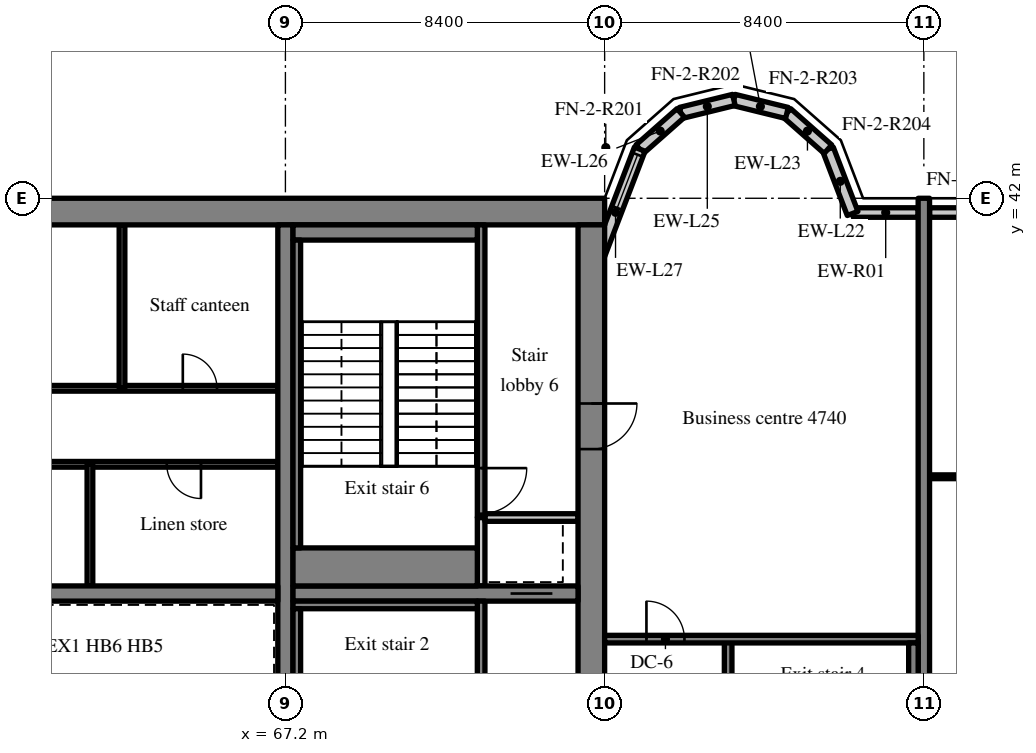
"""IFC4 building model, lengths in metres.
Left out: names, types, materials, properties, quantities, classifications, styles, units other than length and angle.
Written with IfcOpenShell. Run it as: python <this file> out.ifc"""

import sys

from ifc_helpers import new_model, si_unit, direction, frame, frame_2d, origin, place, context, subcontext, project, spatial, rectangle, extrude, source, transform, mapped, element, fill, save


model = new_model("IFC4")
c1 = context("Model", 3, precision=1e-05, world=origin(), true_north=direction((0.0, 1.0)))
c2 = subcontext(c1, "Body", "Model", "MODEL_VIEW")
j1 = project(units=[si_unit("LENGTHUNIT", "METRE"), si_unit("PLANEANGLEUNIT", "RADIAN")], contexts=[c1])
p1 = place(None, origin())
s1 = spatial("IfcSite", under=j1, at=p1, CompositionType="ELEMENT")
p2 = place(p1, origin())
s2 = spatial("IfcBuilding", under=s1, at=p2, CompositionType="ELEMENT")
p3 = place(p2, frame((0.0, 0.0, 193.4)))
s3 = spatial("IfcBuildingStorey", under=s2, at=p3, CompositionType="ELEMENT", Elevation=193.4)
m1 = source(origin(), c2, "Body", "SweptSolid", [
    extrude(rectangle(XDim=50.4, YDim=0.7, at=frame_2d((25.2, 0.0))), origin(), (0.0, 0.0, 1.0), 3.52),
])
p4 = place(p3, frame((25.2, 41.65, 0.0), z_axis=(0.0, 0.0, 1.0), x_axis=(1.0, 0.0, 0.0)))
e1 = element("IfcWall", 1, at=p4, inside=s3, PredefinedType="SHEAR", context=c2, shape_type="MappedRepresentation", body=[
    mapped(m1, transform((0.0, 0.0, 0.0), scale=1.0)),
])
m2 = source(origin(), c2, "Body", "SweptSolid", [
    extrude(rectangle(XDim=18.6, YDim=0.7, at=frame_2d((9.3, 0.0))), origin(), (0.0, 0.0, 1.0), 3.52),
])
p5 = place(p3, frame((75.25, 22.7, 0.0), z_axis=(0.0, 0.0, 1.0), x_axis=(0.0, 1.0, 0.0)))
e2 = element("IfcWall", 2, at=p5, inside=s3, PredefinedType="SHEAR", context=c2, shape_type="MappedRepresentation", body=[
    mapped(m2, transform((0.0, 0.0, 0.0), scale=1.0)),
])
m3 = source(origin(), c2, "Body", "SweptSolid", [
    extrude(rectangle(XDim=1.2, YDim=2.1, at=frame_2d((0.6, 1.05))), frame((0.0, 0.36, 0.0), z_axis=(0.0, -1.0, 0.0), x_axis=(1.0, 0.0, 0.0)), (0.0, 0.0, 1.0), 0.72),
])
p6 = place(p5, frame((12.7, 0.0, 0.0)))
e3 = element("IfcOpeningElement", 3, at=p6, cuts=e2, PredefinedType="OPENING", context=c2, shape_type="MappedRepresentation", body=[
    mapped(m3, transform((0.0, 0.0, 0.0), scale=1.0)),
])
m4 = source(origin(), c2, "Body", "SweptSolid", [
    extrude(rectangle(XDim=18.6, YDim=0.4, at=frame_2d((9.3, 0.0))), origin(), (0.0, 0.0, 1.0), 3.52),
])
p7 = place(p3, frame((67.2, 22.7, 0.0), z_axis=(0.0, 0.0, 1.0), x_axis=(0.0, 1.0, 0.0)))
e4 = element("IfcWall", 4, at=p7, inside=s3, PredefinedType="SHEAR", context=c2, shape_type="MappedRepresentation", body=[
    mapped(m4, transform((0.0, 0.0, 0.0), scale=1.0)),
])
m5 = source(origin(), c2, "Body", "SweptSolid", [
    extrude(rectangle(XDim=16.4, YDim=0.4, at=frame_2d((8.2, 0.0))), origin(), (0.0, 0.0, 1.0), 3.52),
])
p8 = place(p3, frame((50.6, 31.6, 0.0), z_axis=(0.0, 0.0, 1.0), x_axis=(1.0, 0.0, 0.0)))
e5 = element("IfcWall", 5, at=p8, inside=s3, PredefinedType="SHEAR", context=c2, shape_type="MappedRepresentation", body=[
    mapped(m5, transform((0.0, 0.0, 0.0), scale=1.0)),
])
m6 = source(origin(), c2, "Body", "SweptSolid", [
    extrude(rectangle(XDim=1.0, YDim=2.1, at=frame_2d((0.5, 1.05))), frame((0.0, 0.21, 0.0), z_axis=(0.0, -1.0, 0.0), x_axis=(1.0, 0.0, 0.0)), (0.0, 0.0, 1.0), 0.42),
])
p9 = place(p8, frame((0.6, 0.0, 0.0)))
e6 = element("IfcOpeningElement", 6, at=p9, cuts=e5, PredefinedType="OPENING", context=c2, shape_type="MappedRepresentation", body=[
    mapped(m6, transform((0.0, 0.0, 0.0), scale=1.0)),
])
m7 = source(origin(), c2, "Body", "SweptSolid", [
    extrude(rectangle(XDim=7.5, YDim=0.4, at=frame_2d((3.75, 0.0))), origin(), (0.0, 0.0, 1.0), 3.52),
])
p10 = place(p3, frame((67.4, 31.6, 0.0), z_axis=(0.0, 0.0, 1.0), x_axis=(1.0, 0.0, 0.0)))
e7 = element("IfcWall", 7, at=p10, inside=s3, PredefinedType="SHEAR", context=c2, shape_type="MappedRepresentation", body=[
    mapped(m7, transform((0.0, 0.0, 0.0), scale=1.0)),
])
m8 = source(origin(), c2, "Body", "SweptSolid", [
    extrude(rectangle(XDim=1.1, YDim=2.1, at=frame_2d((0.55, 1.05))), frame((0.0, 0.21, 0.0), z_axis=(0.0, -1.0, 0.0), x_axis=(1.0, 0.0, 0.0)), (0.0, 0.0, 1.0), 0.42),
])
p11 = place(p10, frame((5.725, 0.0, 0.0)))
e8 = element("IfcOpeningElement", 8, at=p11, cuts=e7, PredefinedType="OPENING", context=c2, shape_type="MappedRepresentation", body=[
    mapped(m8, transform((0.0, 0.0, 0.0), scale=1.0)),
])
m9 = source(origin(), c2, "Body", "SweptSolid", [
    extrude(rectangle(XDim=20.0, YDim=0.3, at=frame_2d((10.0, 0.0))), origin(), (0.0, 0.0, 1.0), 3.52),
])
p12 = place(p3, frame((84.0, 22.0, 0.0), z_axis=(0.0, 0.0, 1.0), x_axis=(0.0, 1.0, 0.0)))
e9 = element("IfcWall", 9, at=p12, inside=s3, PredefinedType="SHEAR", context=c2, shape_type="MappedRepresentation", body=[
    mapped(m9, transform((0.0, 0.0, 0.0), scale=1.0)),
])
m10 = source(origin(), c2, "Body", "SweptSolid", [
    extrude(rectangle(XDim=1.708, YDim=0.25, at=frame_2d((0.854, 0.0))), origin(), (0.0, 0.0, 1.0), 2.87),
])
p13 = place(p3, frame((83.85, 41.625, 0.0), z_axis=(0.0, 0.0, 1.0), x_axis=(-1.0, 0.0, 0.0)))
e10 = element("IfcWall", 10, at=p13, inside=s3, PredefinedType="SOLIDWALL", context=c2, shape_type="MappedRepresentation", body=[
    mapped(m10, transform((0.0, 0.0, 0.0), scale=1.0)),
])
m11 = source(origin(), c2, "Body", "SweptSolid", [
    extrude(rectangle(XDim=4.095, YDim=0.25, at=frame_2d((2.047, 0.0))), origin(), (0.0, 0.0, 1.0), 2.87),
])
p14 = place(p3, frame((88.245, 41.625, 0.0), z_axis=(0.0, 0.0, 1.0), x_axis=(-1.0, 0.0, 0.0)))
e11 = element("IfcWall", 11, at=p14, inside=s3, PredefinedType="SOLIDWALL", context=c2, shape_type="MappedRepresentation", body=[
    mapped(m11, transform((0.0, 0.0, 0.0), scale=1.0)),
])
m12 = source(origin(), c2, "Body", "SweptSolid", [
    extrude(rectangle(XDim=1.5, YDim=1.5, at=frame_2d((0.75, 0.75))), frame((0.0, 0.135, 0.0), z_axis=(0.0, -1.0, 0.0), x_axis=(1.0, 0.0, 0.0)), (0.0, 0.0, 1.0), 0.27),
])
p15 = place(p14, frame((1.297, 0.0, 0.9)))
e12 = element("IfcOpeningElement", 12, at=p15, cuts=e11, PredefinedType="OPENING", context=c2, shape_type="MappedRepresentation", body=[
    mapped(m12, transform((0.0, 0.0, 0.0), scale=1.0)),
])
m13 = source(origin(), c2, "Body", "SweptSolid", [
    extrude(rectangle(XDim=1.812, YDim=0.3, at=frame_2d((0.906, 0.0))), origin(), (0.0, 0.0, 1.0), 3.52),
])
p16 = place(p3, frame((82.125, 41.6, 0.0), z_axis=(0.0, 0.0, 1.0), x_axis=(-0.357877270961, 0.93376863244, 0.0)))
e13 = element("IfcWall", 13, at=p16, inside=s3, PredefinedType="SOLIDWALL", context=c2, shape_type="MappedRepresentation", body=[
    mapped(m13, transform((0.0, 0.0, 0.0), scale=1.0)),
])
m14 = source(origin(), c2, "Body", "SweptSolid", [
    extrude(rectangle(XDim=1.44, YDim=0.3, at=frame_2d((0.72, 0.0))), origin(), (0.0, 0.0, 1.0), 3.52),
])
p17 = place(p3, frame((81.477, 43.292, 0.0), z_axis=(0.0, 0.0, 1.0), x_axis=(-0.74957555648, 0.661918790432, 0.0)))
e14 = element("IfcWall", 14, at=p17, inside=s3, PredefinedType="SOLIDWALL", context=c2, shape_type="MappedRepresentation", body=[
    mapped(m14, transform((0.0, 0.0, 0.0), scale=1.0)),
])
m15 = source(origin(), c2, "Body", "SweptSolid", [
    extrude(rectangle(XDim=1.439, YDim=0.3, at=frame_2d((0.719, 0.0))), origin(), (0.0, 0.0, 1.0), 3.52),
])
for number, where, z_axis, x_axis in (
    (15, (80.397, 44.245, 0.0), (0.0, 0.0, 1.0), (-0.971, 0.238, 0.0)),
    (16, (79.0, 44.588, 0.0), (0.0, 0.0, 1.0), (-0.971, -0.238, 0.0)),
):
    element("IfcWall", number, at=place(p3, frame(where, z_axis=z_axis, x_axis=x_axis)), inside=s3, PredefinedType="SOLIDWALL", context=c2, shape_type="MappedRepresentation", body=[
        mapped(m15, transform((0.0, 0.0, 0.0), scale=1.0)),
    ])
p18 = place(p3, frame((77.603, 44.245, 0.0), z_axis=(0.0, 0.0, 1.0), x_axis=(-0.74957555648, -0.661918790432, 0.0)))
e17 = element("IfcWall", 17, at=p18, inside=s3, PredefinedType="SOLIDWALL", context=c2, shape_type="MappedRepresentation", body=[
    mapped(m14, transform((0.0, 0.0, 0.0), scale=1.0)),
])
m16 = source(origin(), c2, "Body", "SweptSolid", [
    extrude(rectangle(XDim=3.559, YDim=0.3, at=frame_2d((1.78, 0.0))), origin(), (0.0, 0.0, 1.0), 3.52),
])
p19 = place(p3, frame((76.523, 43.292, 0.0), z_axis=(0.0, 0.0, 1.0), x_axis=(-0.35779745313, -0.933799219604, 0.0)))
e18 = element("IfcWall", 18, at=p19, inside=s3, PredefinedType="SOLIDWALL", context=c2, shape_type="MappedRepresentation", body=[
    mapped(m16, transform((0.0, 0.0, 0.0), scale=1.0)),
])
m17 = source(origin(), c2, "Body", "SweptSolid", [
    extrude(rectangle(XDim=1.5, YDim=2.0, at=frame_2d((0.75, 1.0))), frame((0.0, 0.16, 0.0), z_axis=(0.0, -1.0, 0.0), x_axis=(1.0, 0.0, 0.0)), (0.0, 0.0, 1.0), 0.32),
])
p20 = place(p19, frame((0.156, 0.0, 0.9)))
e19 = element("IfcOpeningElement", 19, at=p20, cuts=e18, PredefinedType="OPENING", context=c2, shape_type="MappedRepresentation", body=[
    mapped(m17, transform((0.0, 0.0, 0.0), scale=1.0)),
])
m18 = source(origin(), c2, "Body", "SweptSolid", [
    extrude(rectangle(XDim=14.2, YDim=0.15, at=frame_2d((7.1, 0.0))), origin(), (0.0, 0.0, 1.0), 3.52),
])
p21 = place(p3, frame((67.0, 35.0, 0.0), z_axis=(0.0, 0.0, 1.0), x_axis=(-1.0, 0.0, 0.0)))
e20 = element("IfcWall", 20, at=p21, inside=s3, PredefinedType="PARTITIONING", context=c2, shape_type="MappedRepresentation", body=[
    mapped(m18, transform((0.0, 0.0, 0.0), scale=1.0)),
])
m19 = source(origin(), c2, "Body", "SweptSolid", [
    extrude(rectangle(XDim=0.9, YDim=2.1, at=frame_2d((0.45, 1.05))), frame((0.0, 0.085, 0.0), z_axis=(0.0, -1.0, 0.0), x_axis=(1.0, 0.0, 0.0)), (0.0, 0.0, 1.0), 0.17),
])
p22 = place(p21, frame((2.022, 0.0, 0.0)))
e21 = element("IfcOpeningElement", 21, at=p22, cuts=e20, PredefinedType="OPENING", context=c2, shape_type="MappedRepresentation", body=[
    mapped(m19, transform((0.0, 0.0, 0.0), scale=1.0)),
])
p23 = place(p21, frame((9.084, 0.0, 0.0)))
e22 = element("IfcOpeningElement", 22, at=p23, cuts=e20, PredefinedType="OPENING", context=c2, shape_type="MappedRepresentation", body=[
    mapped(m19, transform((0.0, 0.0, 0.0), scale=1.0)),
])
m20 = source(origin(), c2, "Body", "SweptSolid", [
    extrude(rectangle(XDim=16.4, YDim=0.15, at=frame_2d((8.2, 0.0))), origin(), (0.0, 0.0, 1.0), 3.52),
])
p24 = place(p3, frame((67.0, 37.0, 0.0), z_axis=(0.0, 0.0, 1.0), x_axis=(-1.0, 0.0, 0.0)))
e23 = element("IfcWall", 23, at=p24, inside=s3, PredefinedType="PARTITIONING", context=c2, shape_type="MappedRepresentation", body=[
    mapped(m20, transform((0.0, 0.0, 0.0), scale=1.0)),
])
p25 = place(p24, frame((1.6, 0.0, 0.0)))
e24 = element("IfcOpeningElement", 24, at=p25, cuts=e23, PredefinedType="OPENING", context=c2, shape_type="MappedRepresentation", body=[
    mapped(m19, transform((0.0, 0.0, 0.0), scale=1.0)),
])
p26 = place(p24, frame((7.34, 0.0, 0.0)))
e25 = element("IfcOpeningElement", 25, at=p26, cuts=e23, PredefinedType="OPENING", context=c2, shape_type="MappedRepresentation", body=[
    mapped(m19, transform((0.0, 0.0, 0.0), scale=1.0)),
])
p27 = place(p24, frame((12.26, 0.0, 0.0)))
e26 = element("IfcOpeningElement", 26, at=p27, cuts=e23, PredefinedType="OPENING", context=c2, shape_type="MappedRepresentation", body=[
    mapped(m19, transform((0.0, 0.0, 0.0), scale=1.0)),
])
p28 = place(p24, frame((14.72, 0.0, 0.0)))
e27 = element("IfcOpeningElement", 27, at=p28, cuts=e23, PredefinedType="OPENING", context=c2, shape_type="MappedRepresentation", body=[
    mapped(m19, transform((0.0, 0.0, 0.0), scale=1.0)),
])
m21 = source(origin(), c2, "Body", "SweptSolid", [
    extrude(rectangle(XDim=3.2, YDim=0.15, at=frame_2d((1.6, 0.0))), origin(), (0.0, 0.0, 1.0), 3.52),
])
p29 = place(p3, frame((62.056, 31.8, 0.0), z_axis=(0.0, 0.0, 1.0), x_axis=(0.0, 1.0, 0.0)))
e28 = element("IfcWall", 28, at=p29, inside=s3, PredefinedType="PARTITIONING", context=c2, shape_type="MappedRepresentation", body=[
    mapped(m21, transform((0.0, 0.0, 0.0), scale=1.0)),
])
m22 = source(origin(), c2, "Body", "SweptSolid", [
    extrude(rectangle(XDim=4.3, YDim=0.15, at=frame_2d((2.15, 0.0))), origin(), (0.0, 0.0, 1.0), 3.52),
])
p30 = place(p3, frame((62.9, 37.0, 0.0), z_axis=(0.0, 0.0, 1.0), x_axis=(0.0, 1.0, 0.0)))
e29 = element("IfcWall", 29, at=p30, inside=s3, PredefinedType="PARTITIONING", context=c2, shape_type="MappedRepresentation", body=[
    mapped(m22, transform((0.0, 0.0, 0.0), scale=1.0)),
])
m23 = source(origin(), c2, "Body", "SweptSolid", [
    extrude(rectangle(XDim=8.7, YDim=0.2, at=frame_2d((4.35, 0.0))), origin(), (0.0, 0.0, 1.0), 3.52),
])
p31 = place(p3, frame((72.35, 22.7, 0.0), z_axis=(0.0, 0.0, 1.0), x_axis=(0.0, 1.0, 0.0)))
e30 = element("IfcWall", 30, at=p31, inside=s3, PredefinedType="SOLIDWALL", context=c2, shape_type="MappedRepresentation", body=[
    mapped(m23, transform((0.0, 0.0, 0.0), scale=1.0)),
])
m24 = source(origin(), c2, "Body", "SweptSolid", [
    extrude(rectangle(XDim=1.2, YDim=2.1, at=frame_2d((0.6, 1.05))), frame((0.0, 0.11, 0.0), z_axis=(0.0, -1.0, 0.0), x_axis=(1.0, 0.0, 0.0)), (0.0, 0.0, 1.0), 0.22),
])
p32 = place(p31, frame((0.9, 0.0, 0.0)))
e31 = element("IfcOpeningElement", 31, at=p32, cuts=e30, PredefinedType="OPENING", context=c2, shape_type="MappedRepresentation", body=[
    mapped(m24, transform((0.0, 0.0, 0.0), scale=1.0)),
])
m25 = source(origin(), c2, "Body", "SweptSolid", [
    extrude(rectangle(XDim=1.8, YDim=0.2, at=frame_2d((0.9, 0.0))), origin(), (0.0, 0.0, 1.0), 3.52),
])
p33 = place(p3, frame((72.35, 31.8, 0.0), z_axis=(0.0, 0.0, 1.0), x_axis=(0.0, 1.0, 0.0)))
e32 = element("IfcWall", 32, at=p33, inside=s3, PredefinedType="SOLIDWALL", context=c2, shape_type="MappedRepresentation", body=[
    mapped(m25, transform((0.0, 0.0, 0.0), scale=1.0)),
])
m26 = source(origin(), c2, "Body", "SweptSolid", [
    extrude(rectangle(XDim=2.45, YDim=0.2, at=frame_2d((1.225, 0.0))), origin(), (0.0, 0.0, 1.0), 3.52),
])
p34 = place(p3, frame((72.45, 33.6, 0.0), z_axis=(0.0, 0.0, 1.0), x_axis=(1.0, 0.0, 0.0)))
e33 = element("IfcWall", 33, at=p34, inside=s3, PredefinedType="SOLIDWALL", context=c2, shape_type="MappedRepresentation", body=[
    mapped(m26, transform((0.0, 0.0, 0.0), scale=1.0)),
])
m27 = source(origin(), c2, "Body", "SweptSolid", [
    extrude(rectangle(XDim=7.7, YDim=0.2, at=frame_2d((3.85, 0.0))), origin(), (0.0, 0.0, 1.0), 3.52),
])
p35 = place(p3, frame((72.35, 33.6, 0.0), z_axis=(0.0, 0.0, 1.0), x_axis=(0.0, 1.0, 0.0)))
e34 = element("IfcWall", 34, at=p35, inside=s3, PredefinedType="SOLIDWALL", context=c2, shape_type="MappedRepresentation", body=[
    mapped(m27, transform((0.0, 0.0, 0.0), scale=1.0)),
])
p36 = place(p35, frame((0.1, 0.0, 0.0)))
e35 = element("IfcOpeningElement", 35, at=p36, cuts=e34, PredefinedType="OPENING", context=c2, shape_type="MappedRepresentation", body=[
    mapped(m24, transform((0.0, 0.0, 0.0), scale=1.0)),
])
m28 = source(origin(), c2, "Body", "SweptSolid", [
    extrude(rectangle(XDim=8.3, YDim=0.2, at=frame_2d((4.15, 0.0))), origin(), (0.0, 0.0, 1.0), 3.52),
])
p37 = place(p3, frame((78.85, 22.1, 0.0), z_axis=(0.0, 0.0, 1.0), x_axis=(0.0, 1.0, 0.0)))
e36 = element("IfcWall", 36, at=p37, inside=s3, PredefinedType="SOLIDWALL", context=c2, shape_type="MappedRepresentation", body=[
    mapped(m28, transform((0.0, 0.0, 0.0), scale=1.0)),
])
p38 = place(p37, frame((0.6, 0.0, 0.0)))
e37 = element("IfcOpeningElement", 37, at=p38, cuts=e36, PredefinedType="OPENING", context=c2, shape_type="MappedRepresentation", body=[
    mapped(m24, transform((0.0, 0.0, 0.0), scale=1.0)),
])
m29 = source(origin(), c2, "Body", "SweptSolid", [
    extrude(rectangle(XDim=8.25, YDim=0.2, at=frame_2d((4.125, 0.0))), origin(), (0.0, 0.0, 1.0), 3.52),
])
p39 = place(p3, frame((83.85, 30.4, 0.0), z_axis=(0.0, 0.0, 1.0), x_axis=(-1.0, 0.0, 0.0)))
e38 = element("IfcWall", 38, at=p39, inside=s3, PredefinedType="SOLIDWALL", context=c2, shape_type="MappedRepresentation", body=[
    mapped(m29, transform((0.0, 0.0, 0.0), scale=1.0)),
])
m30 = source(origin(), c2, "Body", "SweptSolid", [
    extrude(rectangle(XDim=1.0, YDim=2.1, at=frame_2d((0.5, 1.05))), frame((0.0, 0.11, 0.0), z_axis=(0.0, -1.0, 0.0), x_axis=(1.0, 0.0, 0.0)), (0.0, 0.0, 1.0), 0.22),
])
p40 = place(p39, frame((6.15, 0.0, 0.0)))
e39 = element("IfcOpeningElement", 39, at=p40, cuts=e38, PredefinedType="OPENING", context=c2, shape_type="MappedRepresentation", body=[
    mapped(m30, transform((0.0, 0.0, 0.0), scale=1.0)),
])
m31 = source(origin(), c2, "Body", "SweptSolid", [
    extrude(rectangle(XDim=4.85, YDim=0.2, at=frame_2d((2.425, 0.0))), origin(), (0.0, 0.0, 1.0), 3.52),
])
p41 = place(p3, frame((67.4, 31.3, 0.0), z_axis=(0.0, 0.0, 1.0), x_axis=(1.0, 0.0, 0.0)))
e40 = element("IfcWall", 40, at=p41, inside=s3, PredefinedType="SOLIDWALL", context=c2, shape_type="MappedRepresentation", body=[
    mapped(m31, transform((0.0, 0.0, 0.0), scale=1.0)),
])
m32 = source(origin(), c2, "Body", "SweptSolid", [
    extrude(rectangle(XDim=8.1, YDim=0.2, at=frame_2d((4.05, 0.0))), origin(), (0.0, 0.0, 1.0), 3.52),
])
p42 = place(p3, frame((67.5, 23.1, 0.0), z_axis=(0.0, 0.0, 1.0), x_axis=(0.0, 1.0, 0.0)))
e41 = element("IfcWall", 41, at=p42, inside=s3, PredefinedType="SOLIDWALL", context=c2, shape_type="MappedRepresentation", body=[
    mapped(m32, transform((0.0, 0.0, 0.0), scale=1.0)),
])
m33 = source(origin(), c2, "Body", "SweptSolid", [
    extrude(rectangle(XDim=4.85, YDim=0.4, at=frame_2d((2.425, 0.0))), origin(), (0.0, 0.0, 1.0), 3.52),
])
p43 = place(p3, frame((67.4, 41.1, 0.0), z_axis=(0.0, 0.0, 1.0), x_axis=(1.0, 0.0, 0.0)))
e42 = element("IfcWall", 42, at=p43, inside=s3, PredefinedType="SOLIDWALL", context=c2, shape_type="MappedRepresentation", body=[
    mapped(m33, transform((0.0, 0.0, 0.0), scale=1.0)),
])
m34 = source(origin(), c2, "Body", "SweptSolid", [
    extrude(rectangle(XDim=4.85, YDim=1.0, at=frame_2d((2.425, 0.0))), origin(), (0.0, 0.0, 1.0), 3.52),
])
p44 = place(p3, frame((67.4, 32.3, 0.0), z_axis=(0.0, 0.0, 1.0), x_axis=(1.0, 0.0, 0.0)))
e43 = element("IfcWall", 43, at=p44, inside=s3, PredefinedType="SOLIDWALL", context=c2, shape_type="MappedRepresentation", body=[
    mapped(m34, transform((0.0, 0.0, 0.0), scale=1.0)),
])
p45 = place(p3, frame((67.5, 32.8, 0.0), z_axis=(0.0, 0.0, 1.0), x_axis=(0.0, 1.0, 0.0)))
e44 = element("IfcWall", 44, at=p45, inside=s3, PredefinedType="SOLIDWALL", context=c2, shape_type="MappedRepresentation", body=[
    mapped(m32, transform((0.0, 0.0, 0.0), scale=1.0)),
])
m35 = source(origin(), c2, "Body", "SweptSolid", [
    extrude(rectangle(XDim=8.1, YDim=0.25, at=frame_2d((4.05, 0.0))), origin(), (0.0, 0.0, 1.0), 3.52),
])
p46 = place(p3, frame((83.725, 22.2, 0.0), z_axis=(0.0, 0.0, 1.0), x_axis=(0.0, 1.0, 0.0)))
e45 = element("IfcWall", 45, at=p46, inside=s3, PredefinedType="SOLIDWALL", context=c2, shape_type="MappedRepresentation", body=[
    mapped(m35, transform((0.0, 0.0, 0.0), scale=1.0)),
])
m36 = source(origin(), c2, "Body", "SweptSolid", [
    extrude(rectangle(XDim=7.95, YDim=0.1, at=frame_2d((3.975, 0.0))), origin(), (0.0, 0.0, 1.0), 3.52),
])
p47 = place(p3, frame((84.15, 34.672, 0.0), z_axis=(0.0, 0.0, 1.0), x_axis=(1.0, 0.0, 0.0)))
e46 = element("IfcWall", 46, at=p47, inside=s3, PredefinedType="PARTITIONING", context=c2, shape_type="MappedRepresentation", body=[
    mapped(m36, transform((0.0, 0.0, 0.0), scale=1.0)),
])
m37 = source(origin(), c2, "Body", "SweptSolid", [
    extrude(rectangle(XDim=1.8, YDim=2.1, at=frame_2d((0.9, 1.05))), frame((0.0, 0.06, 0.0), z_axis=(0.0, -1.0, 0.0), x_axis=(1.0, 0.0, 0.0)), (0.0, 0.0, 1.0), 0.12),
])
p48 = place(p47, frame((3.075, 0.0, 0.0)))
e47 = element("IfcOpeningElement", 47, at=p48, cuts=e46, PredefinedType="OPENING", context=c2, shape_type="MappedRepresentation", body=[
    mapped(m37, transform((0.0, 0.0, 0.0), scale=1.0)),
])
m38 = source(origin(), c2, "Body", "SweptSolid", [
    extrude(rectangle(XDim=1.5, YDim=2.0, at=frame_2d((0.75, 1.0))), frame((0.0, 0.03, 0.0), z_axis=(0.0, -1.0, 0.0), x_axis=(1.0, 0.0, 0.0)), (0.0, 0.0, 1.0), 0.06),
])
p49 = place(p20, origin())
e48 = element("IfcWindow", 48, at=p49, inside=s3, PartitioningType="SINGLE_PANEL", PredefinedType="WINDOW", context=c2, shape_type="MappedRepresentation", body=[
    mapped(m38, transform((0.0, 0.0, 0.0), scale=1.0)),
])
fill(e19, e48)
m39 = source(origin(), c2, "Body", "SweptSolid", [
    extrude(rectangle(XDim=0.9, YDim=2.1, at=frame_2d((0.45, 1.05))), frame((0.0, 0.025, 0.0), z_axis=(0.0, -1.0, 0.0), x_axis=(1.0, 0.0, 0.0)), (0.0, 0.0, 1.0), 0.05),
])
p50 = place(p22, origin())
e49 = element("IfcDoor", 49, at=p50, inside=s3, OperationType="SINGLE_SWING_LEFT", PredefinedType="DOOR", context=c2, shape_type="MappedRepresentation", body=[
    mapped(m39, transform((0.0, 0.0, 0.0), scale=1.0)),
])
fill(e21, e49)
p51 = place(p25, origin())
e50 = element("IfcDoor", 50, at=p51, inside=s3, OperationType="SINGLE_SWING_RIGHT", PredefinedType="DOOR", context=c2, shape_type="MappedRepresentation", body=[
    mapped(m39, transform((0.0, 0.0, 0.0), scale=1.0)),
])
fill(e24, e50)
m40 = source(origin(), c2, "Body", "SweptSolid", [
    extrude(rectangle(XDim=1.1, YDim=2.1, at=frame_2d((0.55, 1.05))), frame((0.0, 0.025, 0.0), z_axis=(0.0, -1.0, 0.0), x_axis=(1.0, 0.0, 0.0)), (0.0, 0.0, 1.0), 0.05),
])
p52 = place(p11, origin())
e51 = element("IfcDoor", 51, at=p52, inside=s3, OperationType="SLIDING_TO_RIGHT", PredefinedType="DOOR", context=c2, shape_type="MappedRepresentation", body=[
    mapped(m40, transform((0.0, 0.0, 0.0), scale=1.0)),
])
fill(e8, e51)
m41 = source(origin(), c2, "Body", "SweptSolid", [
    extrude(rectangle(XDim=1.2, YDim=2.1, at=frame_2d((0.6, 1.05))), frame((0.0, 0.025, 0.0), z_axis=(0.0, -1.0, 0.0), x_axis=(1.0, 0.0, 0.0)), (0.0, 0.0, 1.0), 0.05),
])
p53 = place(p36, origin())
e52 = element("IfcDoor", 52, at=p53, inside=s3, OperationType="SINGLE_SWING_RIGHT", PredefinedType="DOOR", context=c2, shape_type="MappedRepresentation", body=[
    mapped(m41, transform((0.0, 0.0, 0.0), scale=1.0)),
])
fill(e35, e52)
p54 = place(p6, origin())
e53 = element("IfcDoor", 53, at=p54, inside=s3, OperationType="SINGLE_SWING_RIGHT", PredefinedType="DOOR", context=c2, shape_type="MappedRepresentation", body=[
    mapped(m41, transform((0.0, 0.0, 0.0), scale=1.0)),
])
fill(e3, e53)
m42 = source(origin(), c2, "Body", "SweptSolid", [
    extrude(rectangle(XDim=1.0, YDim=2.1, at=frame_2d((0.5, 1.05))), frame((0.0, 0.025, 0.0), z_axis=(0.0, -1.0, 0.0), x_axis=(1.0, 0.0, 0.0)), (0.0, 0.0, 1.0), 0.05),
])
p55 = place(p40, origin())
e54 = element("IfcDoor", 54, at=p55, inside=s3, OperationType="SINGLE_SWING_RIGHT", PredefinedType="DOOR", context=c2, shape_type="MappedRepresentation", body=[
    mapped(m42, transform((0.0, 0.0, 0.0), scale=1.0)),
])
fill(e39, e54)
save(model, sys.argv[1])
